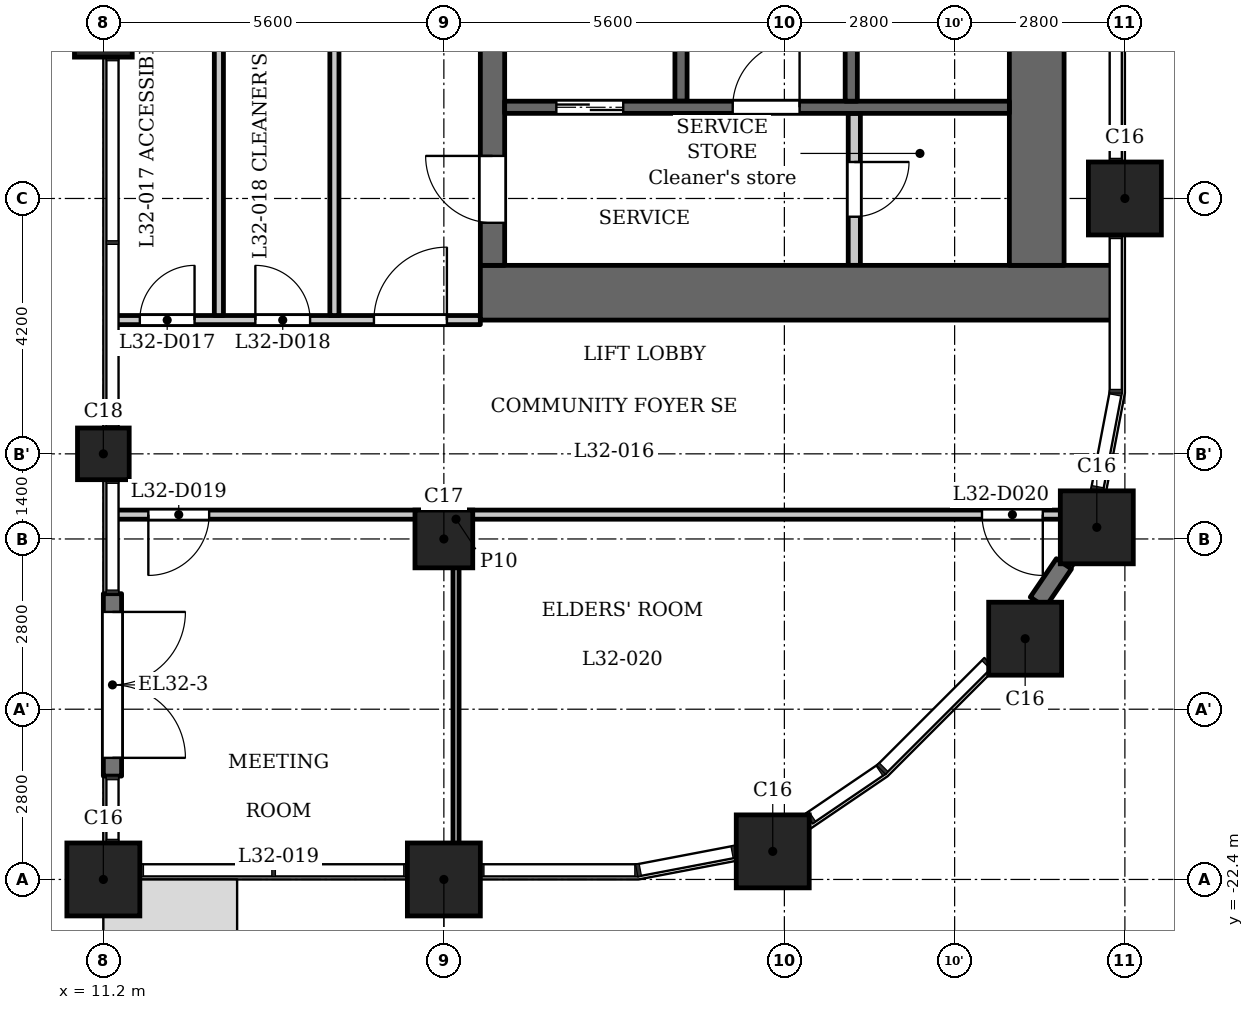
"""IFC4 building model, lengths in metres.
Left out: names, types, materials, properties, quantities, classifications, styles, units other than length and angle.
Written with IfcOpenShell. Run it as: python <this file> out.ifc"""

import sys

from ifc_helpers import new_model, si_unit, direction, frame, frame_2d, origin, origin_2d, place, context, subcontext, project, spatial, rectangle, extrude, element, fill, save


model = new_model("IFC4")
c1 = context("Model", 3, precision=1e-05, world=origin(), true_north=direction((0.0, 1.0)))
c2 = subcontext(c1, "Body", "Model", "MODEL_VIEW")
j1 = project(units=[si_unit("LENGTHUNIT", "METRE"), si_unit("PLANEANGLEUNIT", "RADIAN")], contexts=[c1])
p1 = place(None, origin())
s1 = spatial("IfcSite", under=j1, at=p1, CompositionType="ELEMENT")
p2 = place(p1, origin())
s2 = spatial("IfcBuilding", under=s1, at=p2, CompositionType="ELEMENT")
p3 = place(p2, frame((0.0, 0.0, 125.3)))
s3 = spatial("IfcBuildingStorey", under=s2, at=p3, CompositionType="ELEMENT", Elevation=125.3)
for number, where, z_axis, x_axis in (
    (1, (11.2, -22.4, 0.0), (0.0, 0.0, 1.0), (1.0, 0.0, 0.0)),
    (2, (16.8, -22.4, 0.0), (0.0, 0.0, 1.0), (1.0, 0.0, 0.0)),
    (3, (22.209, -21.938, 0.0), (0.0, 0.0, 1.0), (1.0, 0.0, 0.0)),
    (4, (26.36, -18.44, 0.0), (0.0, 0.0, 1.0), (1.0, 0.0, 0.0)),
    (5, (27.538, -16.609, 0.0), (0.0, 0.0, 1.0), (1.0, 0.0, 0.0)),
    (6, (28.0, -11.2, 0.0), (0.0, 0.0, 1.0), (1.0, 0.0, 0.0)),
):
    element("IfcColumn", number, at=place(p3, frame(where, z_axis=z_axis, x_axis=x_axis)), inside=s3, PredefinedType="COLUMN", context=c2, shape_type="SweptSolid", body=[
        extrude(rectangle(XDim=1.2, YDim=1.2, at=origin_2d()), origin(), (0.0, 0.0, 1.0), 5.4),
    ])
for number, where, z_axis, x_axis in (
    (7, (16.8, -16.8, 0.0), (0.0, 0.0, 1.0), (1.0, 0.0, 0.0)),
    (8, (11.2, -8.4, 0.0), (0.0, 0.0, 1.0), (1.0, 0.0, 0.0)),
):
    element("IfcColumn", number, at=place(p3, frame(where, z_axis=z_axis, x_axis=x_axis)), inside=s3, PredefinedType="COLUMN", context=c2, shape_type="SweptSolid", body=[
        extrude(rectangle(XDim=0.95, YDim=0.95, at=origin_2d()), origin(), (0.0, 0.0, 1.0), 5.4),
    ])
p4 = place(p3, frame((11.2, -15.4, 0.0), z_axis=(0.0, 0.0, 1.0), x_axis=(1.0, 0.0, 0.0)))
e9 = element("IfcColumn", 9, at=p4, inside=s3, PredefinedType="COLUMN", context=c2, shape_type="SweptSolid", body=[
    extrude(rectangle(XDim=0.85, YDim=0.85, at=origin_2d()), origin(), (0.0, 0.0, 1.0), 5.4),
])
p5 = place(p3, frame((11.35, -17.7, 0.0), z_axis=(0.0, 0.0, 1.0), x_axis=(0.0, -1.0, 0.0)))
e10 = element("IfcWall", 10, at=p5, inside=s3, PredefinedType="SOLIDWALL", context=c2, shape_type="SweptSolid", body=[
    extrude(rectangle(XDim=3.0, YDim=0.3, at=frame_2d((1.5, 0.0))), origin(), (0.0, 0.0, 1.0), 4.95),
])
p6 = place(p5, frame((0.3, 0.0, 0.0)))
e11 = element("IfcOpeningElement", 11, at=p6, cuts=e10, PredefinedType="OPENING", context=c2, shape_type="SweptSolid", body=[
    extrude(rectangle(XDim=2.4, YDim=2.3, at=frame_2d((1.2, 1.15))), frame((0.0, 0.16, 0.0), z_axis=(0.0, -1.0, 0.0), x_axis=(1.0, 0.0, 0.0)), (0.0, 0.0, 1.0), 0.32),
])
p7 = place(p3, frame((26.568, -17.84, 0.0), z_axis=(0.0, 0.0, 1.0), x_axis=(0.561986273267, 0.82714655815, 0.0)))
e12 = element("IfcWall", 12, at=p7, inside=s3, PredefinedType="SOLIDWALL", context=c2, shape_type="SweptSolid", body=[
    extrude(rectangle(XDim=0.763, YDim=0.3, at=frame_2d((0.382, 0.0))), origin(), (0.0, 0.0, 1.0), 4.95),
])
p8 = place(p3, frame((20.7, -9.6, 0.0), z_axis=(0.0, 0.0, 1.0), x_axis=(0.0, 1.0, 0.0)))
e13 = element("IfcWall", 13, at=p8, inside=s3, PredefinedType="SHEAR", context=c2, shape_type="SweptSolid", body=[
    extrude(rectangle(XDim=9.75, YDim=0.2, at=frame_2d((4.875, 0.0))), origin(), (0.0, 0.0, 1.0), 4.95),
])
p9 = place(p3, frame((17.4, -12.75, 0.0), z_axis=(0.0, 0.0, 1.0), x_axis=(1.0, 0.0, 0.0)))
e14 = element("IfcWall", 14, at=p9, inside=s3, PredefinedType="SHEAR", context=c2, shape_type="SweptSolid", body=[
    extrude(rectangle(XDim=10.4, YDim=0.9, at=frame_2d((5.2, 0.0))), origin(), (0.0, 0.0, 1.0), 4.95),
])
p10 = place(p3, frame((17.6, -12.3, 0.0), z_axis=(0.0, 0.0, 1.0), x_axis=(0.0, 1.0, 0.0)))
e15 = element("IfcWall", 15, at=p10, inside=s3, PredefinedType="SHEAR", context=c2, shape_type="SweptSolid", body=[
    extrude(rectangle(XDim=24.6, YDim=0.4, at=frame_2d((12.3, 0.0))), origin(), (0.0, 0.0, 1.0), 4.95),
])
p11 = place(p10, frame((6.0, 0.0, 0.0)))
e16 = element("IfcOpeningElement", 16, at=p11, cuts=e15, PredefinedType="OPENING", context=c2, shape_type="SweptSolid", body=[
    extrude(rectangle(XDim=1.1, YDim=2.1, at=frame_2d((0.55, 1.05))), frame((0.0, 0.21, 0.0), z_axis=(0.0, -1.0, 0.0), x_axis=(1.0, 0.0, 0.0)), (0.0, 0.0, 1.0), 0.42),
])
p12 = place(p10, frame((8.4, 0.0, 0.0)))
e17 = element("IfcOpeningElement", 17, at=p12, cuts=e15, PredefinedType="OPENING", context=c2, shape_type="SweptSolid", body=[
    extrude(rectangle(XDim=1.1, YDim=2.1, at=frame_2d((0.55, 1.05))), frame((0.0, 0.21, 0.0), z_axis=(0.0, -1.0, 0.0), x_axis=(1.0, 0.0, 0.0)), (0.0, 0.0, 1.0), 0.42),
])
p13 = place(p10, frame((10.8, 0.0, 0.0)))
e18 = element("IfcOpeningElement", 18, at=p13, cuts=e15, PredefinedType="OPENING", context=c2, shape_type="SweptSolid", body=[
    extrude(rectangle(XDim=1.1, YDim=2.1, at=frame_2d((0.55, 1.05))), frame((0.0, 0.21, 0.0), z_axis=(0.0, -1.0, 0.0), x_axis=(1.0, 0.0, 0.0)), (0.0, 0.0, 1.0), 0.42),
])
p14 = place(p10, frame((15.45, 0.0, 0.0)))
e19 = element("IfcOpeningElement", 19, at=p14, cuts=e15, PredefinedType="OPENING", context=c2, shape_type="SweptSolid", body=[
    extrude(rectangle(XDim=1.1, YDim=2.1, at=frame_2d((0.55, 1.05))), frame((0.0, 0.21, 0.0), z_axis=(0.0, -1.0, 0.0), x_axis=(1.0, 0.0, 0.0)), (0.0, 0.0, 1.0), 0.42),
])
p15 = place(p10, frame((17.85, 0.0, 0.0)))
e20 = element("IfcOpeningElement", 20, at=p15, cuts=e15, PredefinedType="OPENING", context=c2, shape_type="SweptSolid", body=[
    extrude(rectangle(XDim=1.1, YDim=2.1, at=frame_2d((0.55, 1.05))), frame((0.0, 0.21, 0.0), z_axis=(0.0, -1.0, 0.0), x_axis=(1.0, 0.0, 0.0)), (0.0, 0.0, 1.0), 0.42),
])
p16 = place(p10, frame((22.8, 0.0, 0.0)))
e21 = element("IfcOpeningElement", 21, at=p16, cuts=e15, PredefinedType="OPENING", context=c2, shape_type="SweptSolid", body=[
    extrude(rectangle(XDim=1.1, YDim=2.1, at=frame_2d((0.55, 1.05))), frame((0.0, 0.21, 0.0), z_axis=(0.0, -1.0, 0.0), x_axis=(1.0, 0.0, 0.0)), (0.0, 0.0, 1.0), 0.42),
])
p17 = place(p10, frame((0.7, 0.0, 0.0)))
e22 = element("IfcOpeningElement", 22, at=p17, cuts=e15, PredefinedType="OPENING", context=c2, shape_type="SweptSolid", body=[
    extrude(rectangle(XDim=1.1, YDim=2.1, at=frame_2d((0.55, 1.05))), frame((0.0, 0.21, 0.0), z_axis=(0.0, -1.0, 0.0), x_axis=(1.0, 0.0, 0.0)), (0.0, 0.0, 1.0), 0.42),
])
p18 = place(p10, frame((12.775, 0.0, 0.0)))
e23 = element("IfcOpeningElement", 23, at=p18, cuts=e15, PredefinedType="OPENING", context=c2, shape_type="SweptSolid", body=[
    extrude(rectangle(XDim=1.8, YDim=2.1, at=frame_2d((0.9, 1.05))), frame((0.0, 0.21, 0.0), z_axis=(0.0, -1.0, 0.0), x_axis=(1.0, 0.0, 0.0)), (0.0, 0.0, 1.0), 0.42),
])
p19 = place(p3, frame((26.55, -12.3, 0.0), z_axis=(0.0, 0.0, 1.0), x_axis=(0.0, 1.0, 0.0)))
e24 = element("IfcWall", 24, at=p19, inside=s3, PredefinedType="SHEAR", context=c2, shape_type="SweptSolid", body=[
    extrude(rectangle(XDim=24.6, YDim=0.9, at=frame_2d((12.3, 0.0))), origin(), (0.0, 0.0, 1.0), 4.95),
])
p20 = place(p3, frame((23.55, -12.3, 0.0), z_axis=(0.0, 0.0, 1.0), x_axis=(0.0, 1.0, 0.0)))
e25 = element("IfcWall", 25, at=p20, inside=s3, PredefinedType="PARTITIONING", context=c2, shape_type="SweptSolid", body=[
    extrude(rectangle(XDim=2.5, YDim=0.2, at=frame_2d((1.25, 0.0))), origin(), (0.0, 0.0, 1.0), 4.95),
])
p21 = place(p20, frame((0.8, 0.0, 0.0)))
e26 = element("IfcOpeningElement", 26, at=p21, cuts=e25, PredefinedType="OPENING", context=c2, shape_type="SweptSolid", body=[
    extrude(rectangle(XDim=0.9, YDim=2.1, at=frame_2d((0.45, 1.05))), frame((0.0, 0.11, 0.0), z_axis=(0.0, -1.0, 0.0), x_axis=(1.0, 0.0, 0.0)), (0.0, 0.0, 1.0), 0.22),
])
p22 = place(p3, frame((17.8, -9.7, 0.0), z_axis=(0.0, 0.0, 1.0), x_axis=(1.0, 0.0, 0.0)))
e27 = element("IfcWall", 27, at=p22, inside=s3, PredefinedType="SHEAR", context=c2, shape_type="SweptSolid", body=[
    extrude(rectangle(XDim=8.3, YDim=0.2, at=frame_2d((4.15, 0.0))), origin(), (0.0, 0.0, 1.0), 4.95),
])
p23 = place(p22, frame((0.85, 0.0, 0.0)))
e28 = element("IfcOpeningElement", 28, at=p23, cuts=e27, PredefinedType="OPENING", context=c2, shape_type="SweptSolid", body=[
    extrude(rectangle(XDim=1.1, YDim=2.1, at=frame_2d((0.55, 1.05))), frame((0.0, 0.11, 0.0), z_axis=(0.0, -1.0, 0.0), x_axis=(1.0, 0.0, 0.0)), (0.0, 0.0, 1.0), 0.22),
])
p24 = place(p22, frame((3.75, 0.0, 0.0)))
e29 = element("IfcOpeningElement", 29, at=p24, cuts=e27, PredefinedType="OPENING", context=c2, shape_type="SweptSolid", body=[
    extrude(rectangle(XDim=1.1, YDim=2.1, at=frame_2d((0.55, 1.05))), frame((0.0, 0.11, 0.0), z_axis=(0.0, -1.0, 0.0), x_axis=(1.0, 0.0, 0.0)), (0.0, 0.0, 1.0), 0.22),
])
p25 = place(p3, frame((23.5, -9.6, 0.0), z_axis=(0.0, 0.0, 1.0), x_axis=(0.0, 1.0, 0.0)))
e30 = element("IfcWall", 30, at=p25, inside=s3, PredefinedType="SHEAR", context=c2, shape_type="SweptSolid", body=[
    extrude(rectangle(XDim=6.9, YDim=0.2, at=frame_2d((3.45, 0.0))), origin(), (0.0, 0.0, 1.0), 4.95),
])
p26 = place(p3, frame((11.384, -16.4, 0.0), z_axis=(0.0, 0.0, 1.0), x_axis=(1.0, 0.0, 0.0)))
e31 = element("IfcWall", 31, at=p26, inside=s3, PredefinedType="PARTITIONING", context=c2, shape_type="SweptSolid", body=[
    extrude(rectangle(XDim=16.136, YDim=0.15, at=frame_2d((8.068, 0.0))), origin(), (0.0, 0.0, 1.0), 4.95),
])
p27 = place(p26, frame((0.556, 0.0, 0.0)))
e32 = element("IfcOpeningElement", 32, at=p27, cuts=e31, PredefinedType="OPENING", context=c2, shape_type="SweptSolid", body=[
    extrude(rectangle(XDim=1.0, YDim=2.1, at=frame_2d((0.5, 1.05))), frame((0.0, 0.085, 0.0), z_axis=(0.0, -1.0, 0.0), x_axis=(1.0, 0.0, 0.0)), (0.0, 0.0, 1.0), 0.17),
])
p28 = place(p26, frame((14.266, 0.0, 0.0)))
e33 = element("IfcOpeningElement", 33, at=p28, cuts=e31, PredefinedType="OPENING", context=c2, shape_type="SweptSolid", body=[
    extrude(rectangle(XDim=1.0, YDim=2.1, at=frame_2d((0.5, 1.05))), frame((0.0, 0.085, 0.0), z_axis=(0.0, -1.0, 0.0), x_axis=(1.0, 0.0, 0.0)), (0.0, 0.0, 1.0), 0.17),
])
p29 = place(p3, frame((11.384, -13.2, 0.0), z_axis=(0.0, 0.0, 1.0), x_axis=(1.0, 0.0, 0.0)))
e34 = element("IfcWall", 34, at=p29, inside=s3, PredefinedType="PARTITIONING", context=c2, shape_type="SweptSolid", body=[
    extrude(rectangle(XDim=6.016, YDim=0.15, at=frame_2d((3.008, 0.0))), origin(), (0.0, 0.0, 1.0), 4.95),
])
p30 = place(p29, frame((4.266, 0.0, 0.0)))
e35 = element("IfcOpeningElement", 35, at=p30, cuts=e34, PredefinedType="OPENING", context=c2, shape_type="SweptSolid", body=[
    extrude(rectangle(XDim=1.2, YDim=2.1, at=frame_2d((0.6, 1.05))), frame((0.0, 0.085, 0.0), z_axis=(0.0, -1.0, 0.0), x_axis=(1.0, 0.0, 0.0)), (0.0, 0.0, 1.0), 0.17),
])
p31 = place(p29, frame((0.416, 0.0, 0.0)))
e36 = element("IfcOpeningElement", 36, at=p31, cuts=e34, PredefinedType="OPENING", context=c2, shape_type="SweptSolid", body=[
    extrude(rectangle(XDim=0.9, YDim=2.1, at=frame_2d((0.45, 1.05))), frame((0.0, 0.085, 0.0), z_axis=(0.0, -1.0, 0.0), x_axis=(1.0, 0.0, 0.0)), (0.0, 0.0, 1.0), 0.17),
])
p32 = place(p29, frame((2.316, 0.0, 0.0)))
e37 = element("IfcOpeningElement", 37, at=p32, cuts=e34, PredefinedType="OPENING", context=c2, shape_type="SweptSolid", body=[
    extrude(rectangle(XDim=0.9, YDim=2.1, at=frame_2d((0.45, 1.05))), frame((0.0, 0.085, 0.0), z_axis=(0.0, -1.0, 0.0), x_axis=(1.0, 0.0, 0.0)), (0.0, 0.0, 1.0), 0.17),
])
p33 = place(p3, frame((13.1, -13.125, 0.0), z_axis=(0.0, 0.0, 1.0), x_axis=(0.0, 1.0, 0.0)))
e38 = element("IfcWall", 38, at=p33, inside=s3, PredefinedType="PARTITIONING", context=c2, shape_type="SweptSolid", body=[
    extrude(rectangle(XDim=5.941, YDim=0.15, at=frame_2d((2.97, 0.0))), origin(), (0.0, 0.0, 1.0), 4.95),
])
p34 = place(p3, frame((15.0, -13.125, 0.0), z_axis=(0.0, 0.0, 1.0), x_axis=(0.0, 1.0, 0.0)))
e39 = element("IfcWall", 39, at=p34, inside=s3, PredefinedType="PARTITIONING", context=c2, shape_type="SweptSolid", body=[
    extrude(rectangle(XDim=6.356, YDim=0.15, at=frame_2d((3.178, 0.0))), origin(), (0.0, 0.0, 1.0), 4.95),
])
p35 = place(p3, frame((17.0, -22.98, 0.0), z_axis=(0.0, 0.0, 1.0), x_axis=(0.0, 1.0, 0.0)))
e40 = element("IfcWall", 40, at=p35, inside=s3, PredefinedType="PARTITIONING", context=c2, shape_type="SweptSolid", body=[
    extrude(rectangle(XDim=6.505, YDim=0.1, at=frame_2d((3.252, 0.0))), origin(), (0.0, 0.0, 1.0), 4.95),
])
p36 = place(p6, origin())
e41 = element("IfcDoor", 41, at=p36, inside=s3, OperationType="SINGLE_SWING_LEFT", PredefinedType="DOOR", context=c2, shape_type="SweptSolid", body=[
    extrude(rectangle(XDim=2.4, YDim=2.3, at=frame_2d((1.2, 1.15))), frame((0.0, 0.025, 0.0), z_axis=(0.0, -1.0, 0.0), x_axis=(1.0, 0.0, 0.0)), (0.0, 0.0, 1.0), 0.05),
])
fill(e11, e41)
p37 = place(p23, origin())
e42 = element("IfcDoor", 42, at=p37, inside=s3, OperationType="DOUBLE_DOOR_SLIDING", PredefinedType="DOOR", context=c2, shape_type="SweptSolid", body=[
    extrude(rectangle(XDim=1.1, YDim=2.1, at=frame_2d((0.55, 1.05))), frame((0.0, 0.025, 0.0), z_axis=(0.0, -1.0, 0.0), x_axis=(1.0, 0.0, 0.0)), (0.0, 0.0, 1.0), 0.05),
])
fill(e28, e42)
p38 = place(p17, origin())
e43 = element("IfcDoor", 43, at=p38, inside=s3, OperationType="SINGLE_SWING_LEFT", PredefinedType="DOOR", context=c2, shape_type="SweptSolid", body=[
    extrude(rectangle(XDim=1.1, YDim=2.1, at=frame_2d((0.55, 1.05))), frame((0.0, 0.025, 0.0), z_axis=(0.0, -1.0, 0.0), x_axis=(1.0, 0.0, 0.0)), (0.0, 0.0, 1.0), 0.05),
])
fill(e22, e43)
p39 = place(p21, origin())
e44 = element("IfcDoor", 44, at=p39, inside=s3, OperationType="SINGLE_SWING_RIGHT", PredefinedType="DOOR", context=c2, shape_type="SweptSolid", body=[
    extrude(rectangle(XDim=0.9, YDim=2.1, at=frame_2d((0.45, 1.05))), frame((0.0, 0.025, 0.0), z_axis=(0.0, -1.0, 0.0), x_axis=(1.0, 0.0, 0.0)), (0.0, 0.0, 1.0), 0.05),
])
fill(e26, e44)
p40 = place(p24, origin())
e45 = element("IfcDoor", 45, at=p40, inside=s3, OperationType="SINGLE_SWING_LEFT", PredefinedType="DOOR", context=c2, shape_type="SweptSolid", body=[
    extrude(rectangle(XDim=1.1, YDim=2.1, at=frame_2d((0.55, 1.05))), frame((0.0, 0.025, 0.0), z_axis=(0.0, -1.0, 0.0), x_axis=(1.0, 0.0, 0.0)), (0.0, 0.0, 1.0), 0.05),
])
fill(e29, e45)
p41 = place(p30, origin())
e46 = element("IfcDoor", 46, at=p41, inside=s3, OperationType="SINGLE_SWING_LEFT", PredefinedType="DOOR", context=c2, shape_type="SweptSolid", body=[
    extrude(rectangle(XDim=1.2, YDim=2.1, at=frame_2d((0.6, 1.05))), frame((0.0, 0.025, 0.0), z_axis=(0.0, -1.0, 0.0), x_axis=(1.0, 0.0, 0.0)), (0.0, 0.0, 1.0), 0.05),
])
fill(e35, e46)
p42 = place(p31, origin())
e47 = element("IfcDoor", 47, at=p42, inside=s3, OperationType="SINGLE_SWING_LEFT", PredefinedType="DOOR", context=c2, shape_type="SweptSolid", body=[
    extrude(rectangle(XDim=0.9, YDim=2.1, at=frame_2d((0.45, 1.05))), frame((0.0, 0.025, 0.0), z_axis=(0.0, -1.0, 0.0), x_axis=(1.0, 0.0, 0.0)), (0.0, 0.0, 1.0), 0.05),
])
fill(e36, e47)
p43 = place(p32, origin())
e48 = element("IfcDoor", 48, at=p43, inside=s3, OperationType="SINGLE_SWING_RIGHT", PredefinedType="DOOR", context=c2, shape_type="SweptSolid", body=[
    extrude(rectangle(XDim=0.9, YDim=2.1, at=frame_2d((0.45, 1.05))), frame((0.0, 0.025, 0.0), z_axis=(0.0, -1.0, 0.0), x_axis=(1.0, 0.0, 0.0)), (0.0, 0.0, 1.0), 0.05),
])
fill(e37, e48)
p44 = place(p27, origin())
e49 = element("IfcDoor", 49, at=p44, inside=s3, OperationType="SINGLE_SWING_LEFT", PredefinedType="DOOR", context=c2, shape_type="SweptSolid", body=[
    extrude(rectangle(XDim=1.0, YDim=2.1, at=frame_2d((0.5, 1.05))), frame((0.0, 0.025, 0.0), z_axis=(0.0, -1.0, 0.0), x_axis=(1.0, 0.0, 0.0)), (0.0, 0.0, 1.0), 0.05),
])
fill(e32, e49)
p45 = place(p28, origin())
e50 = element("IfcDoor", 50, at=p45, inside=s3, OperationType="SINGLE_SWING_RIGHT", PredefinedType="DOOR", context=c2, shape_type="SweptSolid", body=[
    extrude(rectangle(XDim=1.0, YDim=2.1, at=frame_2d((0.5, 1.05))), frame((0.0, 0.025, 0.0), z_axis=(0.0, -1.0, 0.0), x_axis=(1.0, 0.0, 0.0)), (0.0, 0.0, 1.0), 0.05),
])
fill(e33, e50)
save(model, sys.argv[1])
